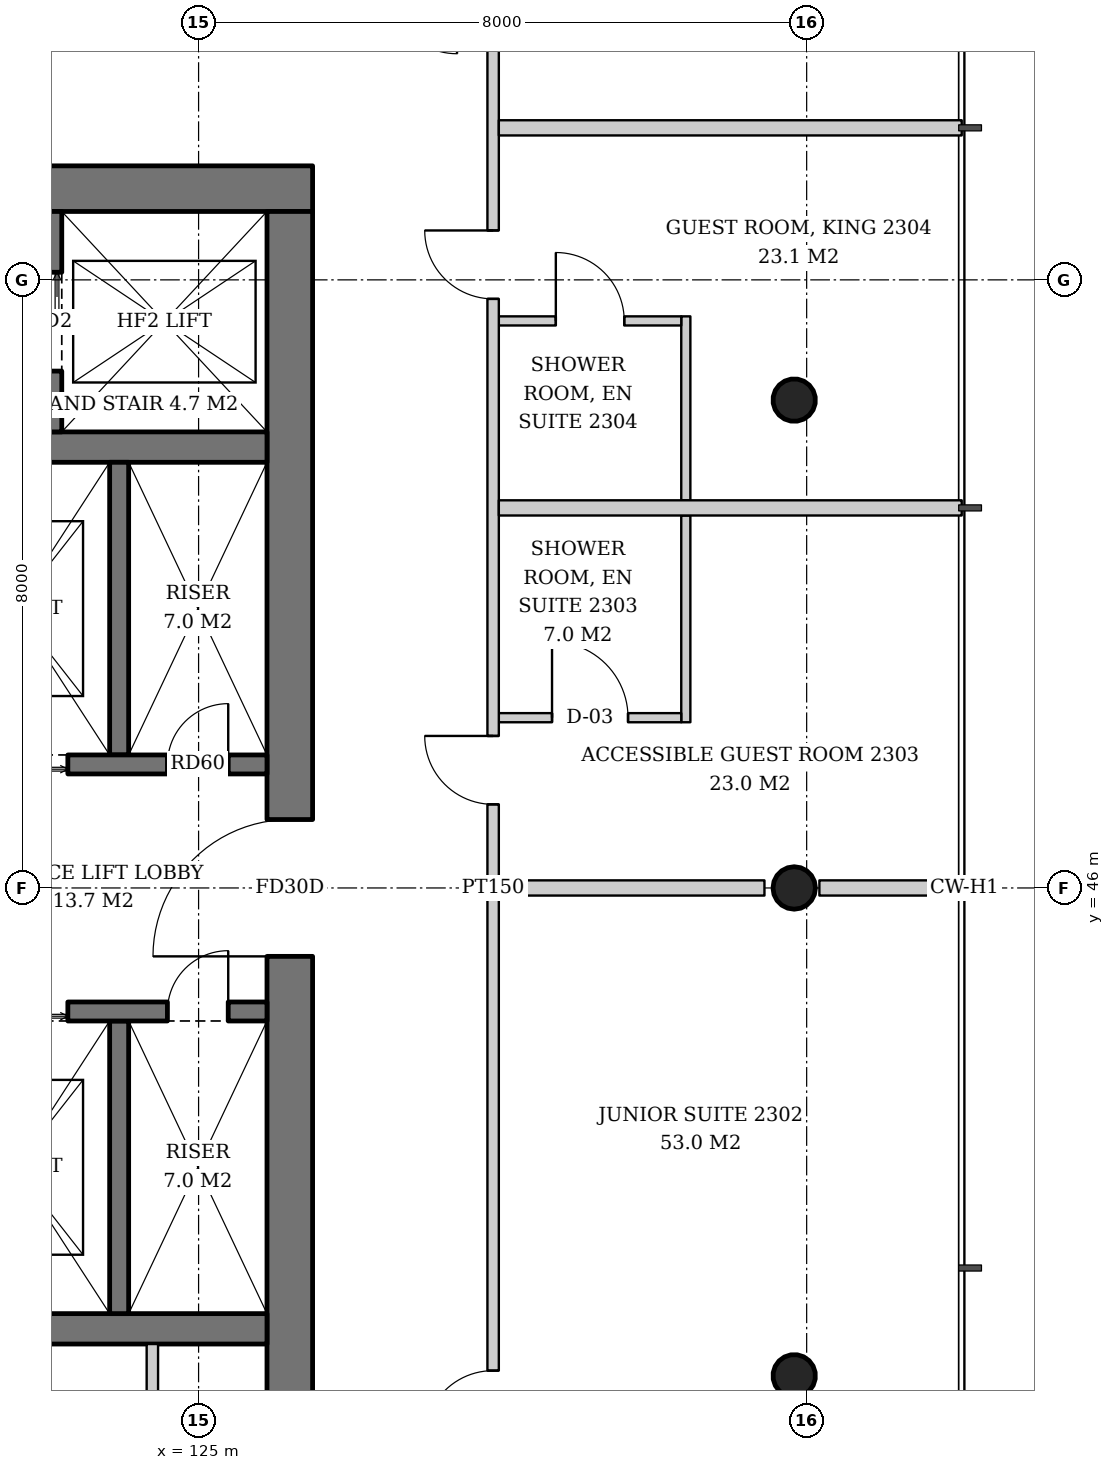
"""IFC4 building model, lengths in metres.
Left out: names, types, materials, properties, quantities, classifications, styles, units other than length and angle.
Written with IfcOpenShell. Run it as: python <this file> out.ifc"""

import sys

from ifc_helpers import new_model, si_unit, direction, frame, frame_2d, origin, origin_2d, place, context, subcontext, project, spatial, rectangle, hollow_circle, extrude, element, fill, save


model = new_model("IFC4")
c1 = context("Model", 3, precision=1e-05, world=origin(), true_north=direction((0.0, 1.0)))
c2 = subcontext(c1, "Body", "Model", "MODEL_VIEW")
j1 = project(units=[si_unit("LENGTHUNIT", "METRE"), si_unit("PLANEANGLEUNIT", "RADIAN")], contexts=[c1])
p1 = place(None, origin())
s1 = spatial("IfcSite", under=j1, at=p1, CompositionType="ELEMENT")
p2 = place(p1, origin())
s2 = spatial("IfcBuilding", under=s1, at=p2, CompositionType="ELEMENT")
p3 = place(p2, frame((0.0, 0.0, 93.2)))
s3 = spatial("IfcBuildingStorey", under=s2, at=p3, CompositionType="ELEMENT", Elevation=93.2)
p4 = place(p3, frame((132.888, 39.556, 0.0), z_axis=(-0.043059584825, 0.021497706284, 0.998841188968), x_axis=(-0.446680166538, -0.894693706707, 0.0)))
e1 = element("IfcColumn", 1, at=p4, inside=s3, PredefinedType="COLUMN", context=c2, shape_type="SweptSolid", body=[
    extrude(hollow_circle(Radius=0.28, WallThickness=0.02, at=origin_2d()), origin(), (0.0, 0.0, 1.0), 3.804),
])
p5 = place(p3, frame((132.888, 46.0, 0.0), z_axis=(-0.043069538298, 0.0, 0.999072076915), x_axis=(0.0, -1.0, 0.0)))
e2 = element("IfcColumn", 2, at=p5, inside=s3, PredefinedType="COLUMN", context=c2, shape_type="SweptSolid", body=[
    extrude(hollow_circle(Radius=0.28, WallThickness=0.02, at=origin_2d()), origin(), (0.0, 0.0, 1.0), 3.803),
])
p6 = place(p3, frame((132.888, 52.444, 0.0), z_axis=(-0.043059584825, -0.021497706284, 0.998841188968), x_axis=(0.446680166538, -0.894693706707, 0.0)))
e3 = element("IfcColumn", 3, at=p6, inside=s3, PredefinedType="COLUMN", context=c2, shape_type="SweptSolid", body=[
    extrude(hollow_circle(Radius=0.28, WallThickness=0.02, at=origin_2d()), origin(), (0.0, 0.0, 1.0), 3.804),
])
p7 = place(p3, frame((107.5, 55.2, 0.0), z_axis=(0.0, 0.0, 1.0), x_axis=(1.0, 0.0, 0.0)))
e4 = element("IfcWall", 4, at=p7, inside=s3, PredefinedType="SHEAR", context=c2, shape_type="SweptSolid", body=[
    extrude(rectangle(XDim=19.0, YDim=0.6, at=frame_2d((9.5, 0.0))), origin(), (0.0, 0.0, 1.0), 3.8),
])
p8 = place(p7, frame((14.14, 0.0, 0.0)))
e5 = element("IfcOpeningElement", 5, at=p8, cuts=e4, PredefinedType="OPENING", context=c2, shape_type="SweptSolid", body=[
    extrude(rectangle(XDim=1.0, YDim=2.1, at=frame_2d((0.5, 1.05))), frame((0.0, 0.31, 0.0), z_axis=(0.0, -1.0, 0.0), x_axis=(1.0, 0.0, 0.0)), (0.0, 0.0, 1.0), 0.62),
])
p9 = place(p7, frame((1.675, 0.0, 0.0)))
e6 = element("IfcOpeningElement", 6, at=p9, cuts=e4, PredefinedType="OPENING", context=c2, shape_type="SweptSolid", body=[
    extrude(rectangle(XDim=1.0, YDim=2.1, at=frame_2d((0.5, 1.05))), frame((0.0, 0.31, 0.0), z_axis=(0.0, -1.0, 0.0), x_axis=(1.0, 0.0, 0.0)), (0.0, 0.0, 1.0), 0.62),
])
p10 = place(p7, frame((3.587, 0.0, 0.0)))
e7 = element("IfcOpeningElement", 7, at=p10, cuts=e4, PredefinedType="OPENING", context=c2, shape_type="SweptSolid", body=[
    extrude(rectangle(XDim=1.0, YDim=2.1, at=frame_2d((0.5, 1.05))), frame((0.0, 0.31, 0.0), z_axis=(0.0, -1.0, 0.0), x_axis=(1.0, 0.0, 0.0)), (0.0, 0.0, 1.0), 0.62),
])
p11 = place(p3, frame((126.2, 37.1, 0.0), z_axis=(0.0, 0.0, 1.0), x_axis=(0.0, 1.0, 0.0)))
e8 = element("IfcWall", 8, at=p11, inside=s3, PredefinedType="SHEAR", context=c2, shape_type="SweptSolid", body=[
    extrude(rectangle(XDim=17.8, YDim=0.6, at=frame_2d((8.9, 0.0))), origin(), (0.0, 0.0, 1.0), 3.8),
])
p12 = place(p11, frame((8.0, 0.0, 0.0)))
e9 = element("IfcOpeningElement", 9, at=p12, cuts=e8, PredefinedType="OPENING", context=c2, shape_type="SweptSolid", body=[
    extrude(rectangle(XDim=1.8, YDim=2.4, at=frame_2d((0.9, 1.2))), frame((0.0, 0.31, 0.0), z_axis=(0.0, -1.0, 0.0), x_axis=(1.0, 0.0, 0.0)), (0.0, 0.0, 1.0), 0.62),
])
for number, where, z_axis, x_axis in (
    (10, (108.1, 40.2, 0.0), (0.0, 0.0, 1.0), (1.0, 0.0, 0.0)),
    (11, (108.1, 51.8, 0.0), (0.0, 0.0, 1.0), (1.0, 0.0, 0.0)),
):
    element("IfcWall", number, at=place(p3, frame(where, z_axis=z_axis, x_axis=x_axis)), inside=s3, PredefinedType="SHEAR", context=c2, shape_type="SweptSolid", body=[
        extrude(rectangle(XDim=17.8, YDim=0.4, at=frame_2d((8.9, 0.0))), origin(), (0.0, 0.0, 1.0), 3.8),
    ])
p13 = place(p3, frame((123.075, 52.0, 0.0), z_axis=(0.0, 0.0, 1.0), x_axis=(0.0, 1.0, 0.0)))
e12 = element("IfcWall", 12, at=p13, inside=s3, PredefinedType="SHEAR", context=c2, shape_type="SweptSolid", body=[
    extrude(rectangle(XDim=2.9, YDim=0.25, at=frame_2d((1.45, 0.0))), origin(), (0.0, 0.0, 1.0), 3.8),
])
p14 = place(p13, frame((0.8, 0.0, 0.0)))
e13 = element("IfcOpeningElement", 13, at=p14, cuts=e12, PredefinedType="OPENING", context=c2, shape_type="SweptSolid", body=[
    extrude(rectangle(XDim=1.3, YDim=2.2, at=frame_2d((0.65, 1.1))), frame((0.0, 0.135, 0.0), z_axis=(0.0, -1.0, 0.0), x_axis=(1.0, 0.0, 0.0)), (0.0, 0.0, 1.0), 0.27),
])
p15 = place(p3, frame((123.955, 47.75, 0.0), z_axis=(0.0, 0.0, 1.0), x_axis=(0.0, 1.0, 0.0)))
e14 = element("IfcWall", 14, at=p15, inside=s3, PredefinedType="SHEAR", context=c2, shape_type="SweptSolid", body=[
    extrude(rectangle(XDim=3.85, YDim=0.25, at=frame_2d((1.925, 0.0))), origin(), (0.0, 0.0, 1.0), 3.8),
])
p16 = place(p3, frame((121.33, 47.625, 0.0), z_axis=(0.0, 0.0, 1.0), x_axis=(1.0, 0.0, 0.0)))
e15 = element("IfcWall", 15, at=p16, inside=s3, PredefinedType="SHEAR", context=c2, shape_type="SweptSolid", body=[
    extrude(rectangle(XDim=4.57, YDim=0.25, at=frame_2d((2.285, 0.0))), origin(), (0.0, 0.0, 1.0), 3.8),
])
p17 = place(p16, frame((0.55, 0.0, 0.0)))
e16 = element("IfcOpeningElement", 16, at=p17, cuts=e15, PredefinedType="OPENING", context=c2, shape_type="SweptSolid", body=[
    extrude(rectangle(XDim=1.4, YDim=2.4, at=frame_2d((0.7, 1.2))), frame((0.0, 0.135, 0.0), z_axis=(0.0, -1.0, 0.0), x_axis=(1.0, 0.0, 0.0)), (0.0, 0.0, 1.0), 0.27),
])
p18 = place(p16, frame((3.26, 0.0, 0.0)))
e17 = element("IfcOpeningElement", 17, at=p18, cuts=e15, PredefinedType="OPENING", context=c2, shape_type="SweptSolid", body=[
    extrude(rectangle(XDim=0.8, YDim=2.0, at=frame_2d((0.4, 1.0))), frame((0.0, 0.135, 0.0), z_axis=(0.0, -1.0, 0.0), x_axis=(1.0, 0.0, 0.0)), (0.0, 0.0, 1.0), 0.27),
])
p19 = place(p3, frame((123.955, 44.25, 0.0), z_axis=(0.0, 0.0, 1.0), x_axis=(0.0, -1.0, 0.0)))
e18 = element("IfcWall", 18, at=p19, inside=s3, PredefinedType="SHEAR", context=c2, shape_type="SweptSolid", body=[
    extrude(rectangle(XDim=3.85, YDim=0.25, at=frame_2d((1.925, 0.0))), origin(), (0.0, 0.0, 1.0), 3.8),
])
p20 = place(p3, frame((121.33, 44.375, 0.0), z_axis=(0.0, 0.0, 1.0), x_axis=(1.0, 0.0, 0.0)))
e19 = element("IfcWall", 19, at=p20, inside=s3, PredefinedType="SHEAR", context=c2, shape_type="SweptSolid", body=[
    extrude(rectangle(XDim=4.57, YDim=0.25, at=frame_2d((2.285, 0.0))), origin(), (0.0, 0.0, 1.0), 3.8),
])
p21 = place(p20, frame((0.55, 0.0, 0.0)))
e20 = element("IfcOpeningElement", 20, at=p21, cuts=e19, PredefinedType="OPENING", context=c2, shape_type="SweptSolid", body=[
    extrude(rectangle(XDim=1.4, YDim=2.4, at=frame_2d((0.7, 1.2))), frame((0.0, 0.135, 0.0), z_axis=(0.0, -1.0, 0.0), x_axis=(1.0, 0.0, 0.0)), (0.0, 0.0, 1.0), 0.27),
])
p22 = place(p20, frame((3.26, 0.0, 0.0)))
e21 = element("IfcOpeningElement", 21, at=p22, cuts=e19, PredefinedType="OPENING", context=c2, shape_type="SweptSolid", body=[
    extrude(rectangle(XDim=0.8, YDim=2.0, at=frame_2d((0.4, 1.0))), frame((0.0, 0.135, 0.0), z_axis=(0.0, -1.0, 0.0), x_axis=(1.0, 0.0, 0.0)), (0.0, 0.0, 1.0), 0.27),
])
p23 = place(p3, frame((124.392, 37.1, 0.0), z_axis=(0.0, 0.0, 1.0), x_axis=(0.0, 1.0, 0.0)))
e22 = element("IfcWall", 22, at=p23, inside=s3, PredefinedType="SOLIDWALL", context=c2, shape_type="SweptSolid", body=[
    extrude(rectangle(XDim=2.9, YDim=0.15, at=frame_2d((1.45, 0.0))), origin(), (0.0, 0.0, 1.0), 3.6),
])
p24 = place(p3, frame((131.41, 48.18, 0.0), z_axis=(0.0, 0.0, 1.0), x_axis=(0.0, 1.0, 0.0)))
e23 = element("IfcWall", 23, at=p24, inside=s3, PredefinedType="PARTITIONING", context=c2, shape_type="SweptSolid", body=[
    extrude(rectangle(XDim=2.72, YDim=0.12, at=frame_2d((1.36, 0.0))), origin(), (0.0, 0.0, 1.0), 3.0),
])
p25 = place(p3, frame((128.95, 48.24, 0.0), z_axis=(0.0, 0.0, 1.0), x_axis=(1.0, 0.0, 0.0)))
e24 = element("IfcWall", 24, at=p25, inside=s3, PredefinedType="PARTITIONING", context=c2, shape_type="SweptSolid", body=[
    extrude(rectangle(XDim=2.4, YDim=0.12, at=frame_2d((1.2, 0.0))), origin(), (0.0, 0.0, 1.0), 3.6),
])
p26 = place(p25, frame((0.7, 0.0, 0.0)))
e25 = element("IfcOpeningElement", 25, at=p26, cuts=e24, PredefinedType="OPENING", context=c2, shape_type="SweptSolid", body=[
    extrude(rectangle(XDim=1.0, YDim=2.1, at=frame_2d((0.5, 1.05))), frame((0.0, 0.07, 0.0), z_axis=(0.0, -1.0, 0.0), x_axis=(1.0, 0.0, 0.0)), (0.0, 0.0, 1.0), 0.14),
])
p27 = place(p3, frame((131.41, 51.1, 0.0), z_axis=(0.0, 0.0, 1.0), x_axis=(0.0, 1.0, 0.0)))
e26 = element("IfcWall", 26, at=p27, inside=s3, PredefinedType="PARTITIONING", context=c2, shape_type="SweptSolid", body=[
    extrude(rectangle(XDim=2.42, YDim=0.12, at=frame_2d((1.21, 0.0))), origin(), (0.0, 0.0, 1.0), 3.0),
])
p28 = place(p3, frame((128.95, 53.46, 0.0), z_axis=(0.0, 0.0, 1.0), x_axis=(1.0, 0.0, 0.0)))
e27 = element("IfcWall", 27, at=p28, inside=s3, PredefinedType="PARTITIONING", context=c2, shape_type="SweptSolid", body=[
    extrude(rectangle(XDim=2.4, YDim=0.12, at=frame_2d((1.2, 0.0))), origin(), (0.0, 0.0, 1.0), 3.0),
])
p29 = place(p28, frame((0.75, 0.0, 0.0)))
e28 = element("IfcOpeningElement", 28, at=p29, cuts=e27, PredefinedType="OPENING", context=c2, shape_type="SweptSolid", body=[
    extrude(rectangle(XDim=0.9, YDim=2.1, at=frame_2d((0.45, 1.05))), frame((0.0, 0.07, 0.0), z_axis=(0.0, -1.0, 0.0), x_axis=(1.0, 0.0, 0.0)), (0.0, 0.0, 1.0), 0.14),
])
p30 = place(p3, frame((128.875, 34.209, 0.0), z_axis=(0.0, 0.0, 1.0), x_axis=(0.0, 1.0, 0.0)))
e29 = element("IfcWall", 29, at=p30, inside=s3, PredefinedType="PARTITIONING", context=c2, shape_type="SweptSolid", body=[
    extrude(rectangle(XDim=23.583, YDim=0.15, at=frame_2d((11.791, 0.0))), origin(), (0.0, 0.0, 1.0), 2.9),
])
p31 = place(p30, frame((0.391, 0.0, 0.0)))
e30 = element("IfcOpeningElement", 30, at=p31, cuts=e29, PredefinedType="OPENING", context=c2, shape_type="SweptSolid", body=[
    extrude(rectangle(XDim=0.9, YDim=2.1, at=frame_2d((0.45, 1.05))), frame((0.0, 0.085, 0.0), z_axis=(0.0, -1.0, 0.0), x_axis=(1.0, 0.0, 0.0)), (0.0, 0.0, 1.0), 0.17),
])
p32 = place(p30, frame((4.541, 0.0, 0.0)))
e31 = element("IfcOpeningElement", 31, at=p32, cuts=e29, PredefinedType="OPENING", context=c2, shape_type="SweptSolid", body=[
    extrude(rectangle(XDim=0.9, YDim=2.1, at=frame_2d((0.45, 1.05))), frame((0.0, 0.085, 0.0), z_axis=(0.0, -1.0, 0.0), x_axis=(1.0, 0.0, 0.0)), (0.0, 0.0, 1.0), 0.17),
])
p33 = place(p30, frame((12.891, 0.0, 0.0)))
e32 = element("IfcOpeningElement", 32, at=p33, cuts=e29, PredefinedType="OPENING", context=c2, shape_type="SweptSolid", body=[
    extrude(rectangle(XDim=0.9, YDim=2.1, at=frame_2d((0.45, 1.05))), frame((0.0, 0.085, 0.0), z_axis=(0.0, -1.0, 0.0), x_axis=(1.0, 0.0, 0.0)), (0.0, 0.0, 1.0), 0.17),
])
p34 = place(p30, frame((19.541, 0.0, 0.0)))
e33 = element("IfcOpeningElement", 33, at=p34, cuts=e29, PredefinedType="OPENING", context=c2, shape_type="SweptSolid", body=[
    extrude(rectangle(XDim=0.9, YDim=2.1, at=frame_2d((0.45, 1.05))), frame((0.0, 0.085, 0.0), z_axis=(0.0, -1.0, 0.0), x_axis=(1.0, 0.0, 0.0)), (0.0, 0.0, 1.0), 0.17),
])
p35 = place(p3, frame((128.95, 46.0, 0.0), z_axis=(0.0, 0.0, 1.0), x_axis=(1.0, 0.0, 0.0)))
e34 = element("IfcWall", 34, at=p35, inside=s3, PredefinedType="PARTITIONING", context=c2, shape_type="SweptSolid", body=[
    extrude(rectangle(XDim=3.495, YDim=0.2, at=frame_2d((1.747, 0.0))), origin(), (0.0, 0.0, 1.0), 3.6),
])
p36 = place(p3, frame((133.167, 46.0, 0.0), z_axis=(0.0, 0.0, 1.0), x_axis=(1.0, 0.0, 0.0)))
e35 = element("IfcWall", 35, at=p36, inside=s3, PredefinedType="PARTITIONING", context=c2, shape_type="SweptSolid", body=[
    extrude(rectangle(XDim=1.873, YDim=0.2, at=frame_2d((0.936, 0.0))), origin(), (0.0, 0.0, 1.0), 3.6),
])
for number, where, z_axis, x_axis in (
    (36, (128.95, 51.0, 0.0), (0.0, 0.0, 1.0), (1.0, 0.0, 0.0)),
    (37, (128.95, 56.0, 0.0), (0.0, 0.0, 1.0), (1.0, 0.0, 0.0)),
):
    element("IfcWall", number, at=place(p3, frame(where, z_axis=z_axis, x_axis=x_axis)), inside=s3, PredefinedType="PARTITIONING", context=c2, shape_type="SweptSolid", body=[
        extrude(rectangle(XDim=6.09, YDim=0.2, at=frame_2d((3.045, 0.0))), origin(), (0.0, 0.0, 1.0), 3.2),
    ])
p37 = place(p14, origin())
e38 = element("IfcDoor", 38, at=p37, inside=s3, OperationType="DOUBLE_DOOR_SLIDING", PredefinedType="DOOR", context=c2, shape_type="SweptSolid", body=[
    extrude(rectangle(XDim=1.3, YDim=2.2, at=frame_2d((0.65, 1.1))), frame((0.0, 0.025, 0.0), z_axis=(0.0, -1.0, 0.0), x_axis=(1.0, 0.0, 0.0)), (0.0, 0.0, 1.0), 0.05),
])
fill(e13, e38)
p38 = place(p17, origin())
e39 = element("IfcDoor", 39, at=p38, inside=s3, OperationType="DOUBLE_DOOR_SLIDING", PredefinedType="DOOR", context=c2, shape_type="SweptSolid", body=[
    extrude(rectangle(XDim=1.4, YDim=2.4, at=frame_2d((0.7, 1.2))), frame((0.0, 0.025, 0.0), z_axis=(0.0, -1.0, 0.0), x_axis=(1.0, 0.0, 0.0)), (0.0, 0.0, 1.0), 0.05),
])
fill(e16, e39)
p39 = place(p18, origin())
e40 = element("IfcDoor", 40, at=p39, inside=s3, OperationType="SINGLE_SWING_RIGHT", PredefinedType="DOOR", context=c2, shape_type="SweptSolid", body=[
    extrude(rectangle(XDim=0.8, YDim=2.0, at=frame_2d((0.4, 1.0))), frame((0.0, 0.025, 0.0), z_axis=(0.0, -1.0, 0.0), x_axis=(1.0, 0.0, 0.0)), (0.0, 0.0, 1.0), 0.05),
])
fill(e17, e40)
p40 = place(p21, origin())
e41 = element("IfcDoor", 41, at=p40, inside=s3, OperationType="DOUBLE_DOOR_SLIDING", PredefinedType="DOOR", context=c2, shape_type="SweptSolid", body=[
    extrude(rectangle(XDim=1.4, YDim=2.4, at=frame_2d((0.7, 1.2))), frame((0.0, 0.025, 0.0), z_axis=(0.0, -1.0, 0.0), x_axis=(1.0, 0.0, 0.0)), (0.0, 0.0, 1.0), 0.05),
])
fill(e20, e41)
p41 = place(p22, origin())
e42 = element("IfcDoor", 42, at=p41, inside=s3, OperationType="SINGLE_SWING_RIGHT", PredefinedType="DOOR", context=c2, shape_type="SweptSolid", body=[
    extrude(rectangle(XDim=0.8, YDim=2.0, at=frame_2d((0.4, 1.0))), frame((0.0, 0.025, 0.0), z_axis=(0.0, -1.0, 0.0), x_axis=(1.0, 0.0, 0.0)), (0.0, 0.0, 1.0), 0.05),
])
fill(e21, e42)
p42 = place(p12, origin())
e43 = element("IfcDoor", 43, at=p42, inside=s3, OperationType="DOUBLE_DOOR_SINGLE_SWING", PredefinedType="DOOR", context=c2, shape_type="SweptSolid", body=[
    extrude(rectangle(XDim=1.8, YDim=2.4, at=frame_2d((0.9, 1.2))), frame((0.0, 0.025, 0.0), z_axis=(0.0, -1.0, 0.0), x_axis=(1.0, 0.0, 0.0)), (0.0, 0.0, 1.0), 0.05),
])
fill(e9, e43)
p43 = place(p26, origin())
e44 = element("IfcDoor", 44, at=p43, inside=s3, OperationType="SINGLE_SWING_LEFT", PredefinedType="DOOR", context=c2, shape_type="SweptSolid", body=[
    extrude(rectangle(XDim=1.0, YDim=2.1, at=frame_2d((0.5, 1.05))), frame((0.0, 0.025, 0.0), z_axis=(0.0, -1.0, 0.0), x_axis=(1.0, 0.0, 0.0)), (0.0, 0.0, 1.0), 0.05),
])
fill(e25, e44)
p44 = place(p29, origin())
e45 = element("IfcDoor", 45, at=p44, inside=s3, OperationType="SINGLE_SWING_LEFT", PredefinedType="DOOR", context=c2, shape_type="SweptSolid", body=[
    extrude(rectangle(XDim=0.9, YDim=2.1, at=frame_2d((0.45, 1.05))), frame((0.0, 0.025, 0.0), z_axis=(0.0, -1.0, 0.0), x_axis=(1.0, 0.0, 0.0)), (0.0, 0.0, 1.0), 0.05),
])
fill(e28, e45)
p45 = place(p32, origin())
e46 = element("IfcDoor", 46, at=p45, inside=s3, OperationType="SINGLE_SWING_LEFT", PredefinedType="DOOR", context=c2, shape_type="SweptSolid", body=[
    extrude(rectangle(XDim=0.9, YDim=2.1, at=frame_2d((0.45, 1.05))), frame((0.0, 0.025, 0.0), z_axis=(0.0, -1.0, 0.0), x_axis=(1.0, 0.0, 0.0)), (0.0, 0.0, 1.0), 0.05),
])
fill(e31, e46)
p46 = place(p33, origin())
e47 = element("IfcDoor", 47, at=p46, inside=s3, OperationType="SINGLE_SWING_RIGHT", PredefinedType="DOOR", context=c2, shape_type="SweptSolid", body=[
    extrude(rectangle(XDim=0.9, YDim=2.1, at=frame_2d((0.45, 1.05))), frame((0.0, 0.025, 0.0), z_axis=(0.0, -1.0, 0.0), x_axis=(1.0, 0.0, 0.0)), (0.0, 0.0, 1.0), 0.05),
])
fill(e32, e47)
p47 = place(p34, origin())
e48 = element("IfcDoor", 48, at=p47, inside=s3, OperationType="SINGLE_SWING_RIGHT", PredefinedType="DOOR", context=c2, shape_type="SweptSolid", body=[
    extrude(rectangle(XDim=0.9, YDim=2.1, at=frame_2d((0.45, 1.05))), frame((0.0, 0.025, 0.0), z_axis=(0.0, -1.0, 0.0), x_axis=(1.0, 0.0, 0.0)), (0.0, 0.0, 1.0), 0.05),
])
fill(e33, e48)
save(model, sys.argv[1])
